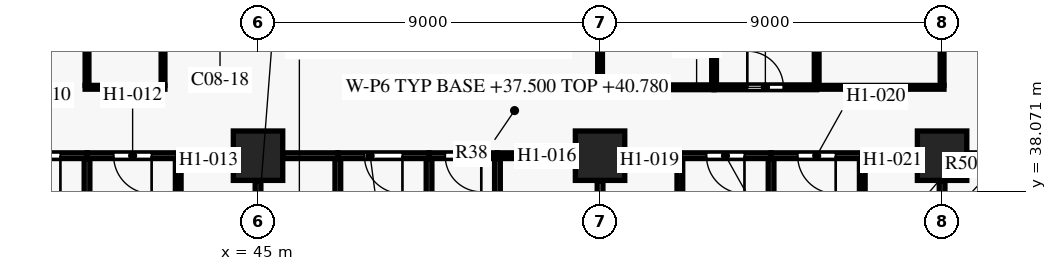
"""IFC4 building model, lengths in metres.
Left out: names, types, materials, properties, quantities, classifications, styles, units other than length and angle.
Written with IfcOpenShell. Run it as: python <this file> out.ifc"""

import sys

from ifc_helpers import new_model, si_unit, direction, frame, frame_2d, origin, origin_2d, place, context, subcontext, project, spatial, rectangle, extrude, element, fill, save


model = new_model("IFC4")
c1 = context("Model", 3, precision=1e-05, world=origin(), true_north=direction((0.0, 1.0)))
c2 = subcontext(c1, "Body", "Model", "MODEL_VIEW")
j1 = project(units=[si_unit("LENGTHUNIT", "METRE"), si_unit("PLANEANGLEUNIT", "RADIAN")], contexts=[c1])
p1 = place(None, origin())
s1 = spatial("IfcSite", under=j1, at=p1, CompositionType="ELEMENT")
p2 = place(p1, origin())
s2 = spatial("IfcBuilding", under=s1, at=p2, CompositionType="ELEMENT")
p3 = place(p2, frame((0.0, 0.0, 37.5)))
s3 = spatial("IfcBuildingStorey", under=s2, at=p3, CompositionType="ELEMENT", Elevation=37.5)
for number, where, z_axis, x_axis in (
    (1, (45.0, 39.0, 0.0), (0.0, 0.0, 1.0), (1.0, 0.0, 0.0)),
    (2, (54.0, 39.0, 0.0), (0.0, 0.0, 1.0), (1.0, 0.0, 0.0)),
    (3, (63.0, 39.0, 0.0), (0.0, 0.0, 1.0), (1.0, 0.0, 0.0)),
):
    element("IfcColumn", number, at=place(p3, frame(where, z_axis=z_axis, x_axis=x_axis)), inside=s3, PredefinedType="COLUMN", context=c2, shape_type="SweptSolid", body=[
        extrude(rectangle(XDim=1.3, YDim=1.3, at=origin_2d()), origin(), (0.0, 0.0, 1.0), 3.6),
    ])
p4 = place(p3, frame((47.1, 36.075, 0.0), z_axis=(0.0, 0.0, 1.0), x_axis=(0.0, 1.0, 0.0)))
e4 = element("IfcWall", 4, at=p4, inside=s3, PredefinedType="PARTITIONING", context=c2, shape_type="SweptSolid", body=[
    extrude(rectangle(XDim=2.85, YDim=0.15, at=frame_2d((1.425, 0.0))), origin(), (0.0, 0.0, 1.0), 2.58),
])
p5 = place(p4, frame((1.025, 0.0, 0.0)))
e5 = element("IfcOpeningElement", 5, at=p5, cuts=e4, PredefinedType="OPENING", context=c2, shape_type="SweptSolid", body=[
    extrude(rectangle(XDim=0.8, YDim=2.1, at=frame_2d((0.4, 1.05))), frame((0.0, 0.085, 0.0), z_axis=(0.0, -1.0, 0.0), x_axis=(1.0, 0.0, 0.0)), (0.0, 0.0, 1.0), 0.17),
])
p6 = place(p3, frame((56.1, 36.075, 0.0), z_axis=(0.0, 0.0, 1.0), x_axis=(0.0, 1.0, 0.0)))
e6 = element("IfcWall", 6, at=p6, inside=s3, PredefinedType="PARTITIONING", context=c2, shape_type="SweptSolid", body=[
    extrude(rectangle(XDim=2.85, YDim=0.15, at=frame_2d((1.425, 0.0))), origin(), (0.0, 0.0, 1.0), 2.58),
])
p7 = place(p6, frame((1.025, 0.0, 0.0)))
e7 = element("IfcOpeningElement", 7, at=p7, cuts=e6, PredefinedType="OPENING", context=c2, shape_type="SweptSolid", body=[
    extrude(rectangle(XDim=0.8, YDim=2.1, at=frame_2d((0.4, 1.05))), frame((0.0, 0.085, 0.0), z_axis=(0.0, -1.0, 0.0), x_axis=(1.0, 0.0, 0.0)), (0.0, 0.0, 1.0), 0.17),
])
for number, where, z_axis, x_axis in (
    (8, (45.0, 38.345, 0.0), (0.0, 0.0, 1.0), (0.0, -1.0, 0.0)),
    (9, (54.0, 38.345, 0.0), (0.0, 0.0, 1.0), (0.0, -1.0, 0.0)),
    (10, (63.0, 38.345, 0.0), (0.0, 0.0, 1.0), (0.0, -1.0, 0.0)),
):
    element("IfcWall", number, at=place(p3, frame(where, z_axis=z_axis, x_axis=x_axis)), inside=s3, PredefinedType="PARTITIONING", context=c2, shape_type="SweptSolid", body=[
        extrude(rectangle(XDim=2.27, YDim=0.15, at=frame_2d((1.135, 0.0))), origin(), (0.0, 0.0, 1.0), 2.73),
    ])
p8 = place(p3, frame((40.5, 38.925, 0.0), z_axis=(0.0, 0.0, 1.0), x_axis=(0.0, -1.0, 0.0)))
e11 = element("IfcWall", 11, at=p8, inside=s3, PredefinedType="PARTITIONING", context=c2, shape_type="SweptSolid", body=[
    extrude(rectangle(XDim=11.35, YDim=0.15, at=frame_2d((5.675, 0.0))), origin(), (0.0, 0.0, 1.0), 2.58),
])
p9 = place(p3, frame((42.9, 38.925, 0.0), z_axis=(0.0, 0.0, 1.0), x_axis=(0.0, -1.0, 0.0)))
e12 = element("IfcWall", 12, at=p9, inside=s3, PredefinedType="PARTITIONING", context=c2, shape_type="SweptSolid", body=[
    extrude(rectangle(XDim=2.85, YDim=0.15, at=frame_2d((1.425, 0.0))), origin(), (0.0, 0.0, 1.0), 2.58),
])
p10 = place(p9, frame((1.025, 0.0, 0.0)))
e13 = element("IfcOpeningElement", 13, at=p10, cuts=e12, PredefinedType="OPENING", context=c2, shape_type="SweptSolid", body=[
    extrude(rectangle(XDim=0.8, YDim=2.1, at=frame_2d((0.4, 1.05))), frame((0.0, 0.085, 0.0), z_axis=(0.0, -1.0, 0.0), x_axis=(1.0, 0.0, 0.0)), (0.0, 0.0, 1.0), 0.17),
])
p11 = place(p3, frame((49.5, 38.925, 0.0), z_axis=(0.0, 0.0, 1.0), x_axis=(0.0, -1.0, 0.0)))
e14 = element("IfcWall", 14, at=p11, inside=s3, PredefinedType="PARTITIONING", context=c2, shape_type="SweptSolid", body=[
    extrude(rectangle(XDim=11.35, YDim=0.15, at=frame_2d((5.675, 0.0))), origin(), (0.0, 0.0, 1.0), 2.58),
])
p12 = place(p3, frame((51.3, 38.925, 0.0), z_axis=(0.0, 0.0, 1.0), x_axis=(0.0, -1.0, 0.0)))
e15 = element("IfcWall", 15, at=p12, inside=s3, PredefinedType="PARTITIONING", context=c2, shape_type="SweptSolid", body=[
    extrude(rectangle(XDim=2.85, YDim=0.15, at=frame_2d((1.425, 0.0))), origin(), (0.0, 0.0, 1.0), 2.58),
])
p13 = place(p12, frame((0.95, 0.0, 0.0)))
e16 = element("IfcOpeningElement", 16, at=p13, cuts=e15, PredefinedType="OPENING", context=c2, shape_type="SweptSolid", body=[
    extrude(rectangle(XDim=0.95, YDim=2.1, at=frame_2d((0.475, 1.05))), frame((0.0, 0.085, 0.0), z_axis=(0.0, -1.0, 0.0), x_axis=(1.0, 0.0, 0.0)), (0.0, 0.0, 1.0), 0.17),
])
p14 = place(p3, frame((58.5, 38.925, 0.0), z_axis=(0.0, 0.0, 1.0), x_axis=(0.0, -1.0, 0.0)))
e17 = element("IfcWall", 17, at=p14, inside=s3, PredefinedType="PARTITIONING", context=c2, shape_type="SweptSolid", body=[
    extrude(rectangle(XDim=11.35, YDim=0.15, at=frame_2d((5.675, 0.0))), origin(), (0.0, 0.0, 1.0), 2.58),
])
p15 = place(p3, frame((60.9, 38.925, 0.0), z_axis=(0.0, 0.0, 1.0), x_axis=(0.0, -1.0, 0.0)))
e18 = element("IfcWall", 18, at=p15, inside=s3, PredefinedType="PARTITIONING", context=c2, shape_type="SweptSolid", body=[
    extrude(rectangle(XDim=2.85, YDim=0.15, at=frame_2d((1.425, 0.0))), origin(), (0.0, 0.0, 1.0), 2.58),
])
p16 = place(p15, frame((1.025, 0.0, 0.0)))
e19 = element("IfcOpeningElement", 19, at=p16, cuts=e18, PredefinedType="OPENING", context=c2, shape_type="SweptSolid", body=[
    extrude(rectangle(XDim=0.8, YDim=2.1, at=frame_2d((0.4, 1.05))), frame((0.0, 0.085, 0.0), z_axis=(0.0, -1.0, 0.0), x_axis=(1.0, 0.0, 0.0)), (0.0, 0.0, 1.0), 0.17),
])
p17 = place(p3, frame((40.5, 39.0, 0.0), z_axis=(0.0, 0.0, 1.0), x_axis=(-1.0, 0.0, 0.0)))
e20 = element("IfcWall", 20, at=p17, inside=s3, PredefinedType="PARTITIONING", context=c2, shape_type="SweptSolid", body=[
    extrude(rectangle(XDim=2.4, YDim=0.15, at=frame_2d((1.2, 0.0))), origin(), (0.0, 0.0, 1.0), 2.58),
])
p18 = place(p17, frame((0.7, 0.0, 0.0)))
e21 = element("IfcOpeningElement", 21, at=p18, cuts=e20, PredefinedType="OPENING", context=c2, shape_type="SweptSolid", body=[
    extrude(rectangle(XDim=1.0, YDim=2.1, at=frame_2d((0.5, 1.05))), frame((0.0, 0.085, 0.0), z_axis=(0.0, -1.0, 0.0), x_axis=(1.0, 0.0, 0.0)), (0.0, 0.0, 1.0), 0.17),
])
p19 = place(p3, frame((42.9, 39.0, 0.0), z_axis=(0.0, 0.0, 1.0), x_axis=(-1.0, 0.0, 0.0)))
e22 = element("IfcWall", 22, at=p19, inside=s3, PredefinedType="PARTITIONING", context=c2, shape_type="SweptSolid", body=[
    extrude(rectangle(XDim=2.4, YDim=0.15, at=frame_2d((1.2, 0.0))), origin(), (0.0, 0.0, 1.0), 2.58),
])
p20 = place(p19, frame((0.7, 0.0, 0.0)))
e23 = element("IfcOpeningElement", 23, at=p20, cuts=e22, PredefinedType="OPENING", context=c2, shape_type="SweptSolid", body=[
    extrude(rectangle(XDim=1.0, YDim=2.1, at=frame_2d((0.5, 1.05))), frame((0.0, 0.085, 0.0), z_axis=(0.0, -1.0, 0.0), x_axis=(1.0, 0.0, 0.0)), (0.0, 0.0, 1.0), 0.17),
])
for number, where, z_axis, x_axis in (
    (24, (44.345, 39.0, 0.0), (0.0, 0.0, 1.0), (-1.0, 0.0, 0.0)),
    (25, (47.1, 39.0, 0.0), (0.0, 0.0, 1.0), (-1.0, 0.0, 0.0)),
):
    element("IfcWall", number, at=place(p3, frame(where, z_axis=z_axis, x_axis=x_axis)), inside=s3, PredefinedType="PARTITIONING", context=c2, shape_type="SweptSolid", body=[
        extrude(rectangle(XDim=1.445, YDim=0.15, at=frame_2d((0.723, 0.0))), origin(), (0.0, 0.0, 1.0), 2.58),
    ])
p21 = place(p3, frame((49.5, 39.0, 0.0), z_axis=(0.0, 0.0, 1.0), x_axis=(-1.0, 0.0, 0.0)))
e26 = element("IfcWall", 26, at=p21, inside=s3, PredefinedType="PARTITIONING", context=c2, shape_type="SweptSolid", body=[
    extrude(rectangle(XDim=2.4, YDim=0.15, at=frame_2d((1.2, 0.0))), origin(), (0.0, 0.0, 1.0), 2.58),
])
p22 = place(p21, frame((0.7, 0.0, 0.0)))
e27 = element("IfcOpeningElement", 27, at=p22, cuts=e26, PredefinedType="OPENING", context=c2, shape_type="SweptSolid", body=[
    extrude(rectangle(XDim=1.0, YDim=2.1, at=frame_2d((0.5, 1.05))), frame((0.0, 0.085, 0.0), z_axis=(0.0, -1.0, 0.0), x_axis=(1.0, 0.0, 0.0)), (0.0, 0.0, 1.0), 0.17),
])
p23 = place(p3, frame((51.3, 39.0, 0.0), z_axis=(0.0, 0.0, 1.0), x_axis=(-1.0, 0.0, 0.0)))
e28 = element("IfcWall", 28, at=p23, inside=s3, PredefinedType="PARTITIONING", context=c2, shape_type="SweptSolid", body=[
    extrude(rectangle(XDim=1.8, YDim=0.15, at=frame_2d((0.9, 0.0))), origin(), (0.0, 0.0, 1.0), 2.58),
])
p24 = place(p23, frame((0.425, 0.0, 0.0)))
e29 = element("IfcOpeningElement", 29, at=p24, cuts=e28, PredefinedType="OPENING", context=c2, shape_type="SweptSolid", body=[
    extrude(rectangle(XDim=0.95, YDim=2.1, at=frame_2d((0.475, 1.05))), frame((0.0, 0.085, 0.0), z_axis=(0.0, -1.0, 0.0), x_axis=(1.0, 0.0, 0.0)), (0.0, 0.0, 1.0), 0.17),
])
p25 = place(p3, frame((53.345, 39.0, 0.0), z_axis=(0.0, 0.0, 1.0), x_axis=(-1.0, 0.0, 0.0)))
e30 = element("IfcWall", 30, at=p25, inside=s3, PredefinedType="PARTITIONING", context=c2, shape_type="SweptSolid", body=[
    extrude(rectangle(XDim=2.045, YDim=0.15, at=frame_2d((1.022, 0.0))), origin(), (0.0, 0.0, 1.0), 2.58),
])
p26 = place(p3, frame((56.1, 39.0, 0.0), z_axis=(0.0, 0.0, 1.0), x_axis=(-1.0, 0.0, 0.0)))
e31 = element("IfcWall", 31, at=p26, inside=s3, PredefinedType="PARTITIONING", context=c2, shape_type="SweptSolid", body=[
    extrude(rectangle(XDim=1.445, YDim=0.15, at=frame_2d((0.723, 0.0))), origin(), (0.0, 0.0, 1.0), 2.58),
])
p27 = place(p3, frame((58.5, 39.0, 0.0), z_axis=(0.0, 0.0, 1.0), x_axis=(-1.0, 0.0, 0.0)))
e32 = element("IfcWall", 32, at=p27, inside=s3, PredefinedType="PARTITIONING", context=c2, shape_type="SweptSolid", body=[
    extrude(rectangle(XDim=2.4, YDim=0.15, at=frame_2d((1.2, 0.0))), origin(), (0.0, 0.0, 1.0), 2.58),
])
p28 = place(p27, frame((0.7, 0.0, 0.0)))
e33 = element("IfcOpeningElement", 33, at=p28, cuts=e32, PredefinedType="OPENING", context=c2, shape_type="SweptSolid", body=[
    extrude(rectangle(XDim=1.0, YDim=2.1, at=frame_2d((0.5, 1.05))), frame((0.0, 0.085, 0.0), z_axis=(0.0, -1.0, 0.0), x_axis=(1.0, 0.0, 0.0)), (0.0, 0.0, 1.0), 0.17),
])
p29 = place(p3, frame((60.9, 39.0, 0.0), z_axis=(0.0, 0.0, 1.0), x_axis=(-1.0, 0.0, 0.0)))
e34 = element("IfcWall", 34, at=p29, inside=s3, PredefinedType="PARTITIONING", context=c2, shape_type="SweptSolid", body=[
    extrude(rectangle(XDim=2.4, YDim=0.15, at=frame_2d((1.2, 0.0))), origin(), (0.0, 0.0, 1.0), 2.58),
])
p30 = place(p29, frame((0.7, 0.0, 0.0)))
e35 = element("IfcOpeningElement", 35, at=p30, cuts=e34, PredefinedType="OPENING", context=c2, shape_type="SweptSolid", body=[
    extrude(rectangle(XDim=1.0, YDim=2.1, at=frame_2d((0.5, 1.05))), frame((0.0, 0.085, 0.0), z_axis=(0.0, -1.0, 0.0), x_axis=(1.0, 0.0, 0.0)), (0.0, 0.0, 1.0), 0.17),
])
p31 = place(p3, frame((62.345, 39.0, 0.0), z_axis=(0.0, 0.0, 1.0), x_axis=(-1.0, 0.0, 0.0)))
e36 = element("IfcWall", 36, at=p31, inside=s3, PredefinedType="PARTITIONING", context=c2, shape_type="SweptSolid", body=[
    extrude(rectangle(XDim=1.445, YDim=0.15, at=frame_2d((0.723, 0.0))), origin(), (0.0, 0.0, 1.0), 2.58),
])
p32 = place(p3, frame((64.875, 39.0, 0.0), z_axis=(0.0, 0.0, 1.0), x_axis=(-1.0, 0.0, 0.0)))
e37 = element("IfcWall", 37, at=p32, inside=s3, PredefinedType="PARTITIONING", context=c2, shape_type="SweptSolid", body=[
    extrude(rectangle(XDim=1.22, YDim=0.15, at=frame_2d((0.61, 0.0))), origin(), (0.0, 0.0, 1.0), 2.58),
])
p33 = place(p3, frame((40.45, 40.8, 0.0), z_axis=(0.0, 0.0, 1.0), x_axis=(1.0, 0.0, 0.0)))
e38 = element("IfcWall", 38, at=p33, inside=s3, PredefinedType="PARTITIONING", context=c2, shape_type="SweptSolid", body=[
    extrude(rectangle(XDim=2.1, YDim=0.1, at=frame_2d((1.05, 0.0))), origin(), (0.0, 0.0, 1.0), 3.28),
])
p34 = place(p3, frame((53.938, 40.8, 0.0), z_axis=(0.0, 0.0, 1.0), x_axis=(1.0, 0.0, 0.0)))
e39 = element("IfcWall", 39, at=p34, inside=s3, PredefinedType="PARTITIONING", context=c2, shape_type="SweptSolid", body=[
    extrude(rectangle(XDim=3.062, YDim=0.125, at=frame_2d((1.531, 0.0))), origin(), (0.0, 0.0, 1.0), 2.73),
])
p35 = place(p3, frame((57.0, 40.8, 0.0), z_axis=(0.0, 0.0, 1.0), x_axis=(1.0, 0.0, 0.0)))
e40 = element("IfcWall", 40, at=p35, inside=s3, PredefinedType="PARTITIONING", context=c2, shape_type="SweptSolid", body=[
    extrude(rectangle(XDim=2.7, YDim=0.125, at=frame_2d((1.35, 0.0))), origin(), (0.0, 0.0, 1.0), 3.28),
])
p36 = place(p35, frame((0.875, 0.0, 0.0)))
e41 = element("IfcOpeningElement", 41, at=p36, cuts=e40, PredefinedType="OPENING", context=c2, shape_type="SweptSolid", body=[
    extrude(rectangle(XDim=0.95, YDim=2.1, at=frame_2d((0.475, 1.05))), frame((0.0, 0.073, 0.0), z_axis=(0.0, -1.0, 0.0), x_axis=(1.0, 0.0, 0.0)), (0.0, 0.0, 1.0), 0.145),
])
p37 = place(p3, frame((59.7, 40.8, 0.0), z_axis=(0.0, 0.0, 1.0), x_axis=(1.0, 0.0, 0.0)))
e42 = element("IfcWall", 42, at=p37, inside=s3, PredefinedType="PARTITIONING", context=c2, shape_type="SweptSolid", body=[
    extrude(rectangle(XDim=3.35, YDim=0.1, at=frame_2d((1.675, 0.0))), origin(), (0.0, 0.0, 1.0), 2.73),
])
p38 = place(p3, frame((63.0, 40.85, 0.0), z_axis=(0.0, 0.0, 1.0), x_axis=(0.0, 1.0, 0.0)))
e43 = element("IfcWall", 43, at=p38, inside=s3, PredefinedType="PARTITIONING", context=c2, shape_type="SweptSolid", body=[
    extrude(rectangle(XDim=8.3, YDim=0.1, at=frame_2d((4.15, 0.0))), origin(), (0.0, 0.0, 1.0), 2.73),
])
p39 = place(p3, frame((54.0, 49.137, 0.0), z_axis=(0.0, 0.0, 1.0), x_axis=(0.0, -1.0, 0.0)))
e44 = element("IfcWall", 44, at=p39, inside=s3, PredefinedType="PARTITIONING", context=c2, shape_type="SweptSolid", body=[
    extrude(rectangle(XDim=8.275, YDim=0.125, at=frame_2d((4.137, 0.0))), origin(), (0.0, 0.0, 1.0), 2.73),
])
for number, where, z_axis, x_axis in (
    (45, (57.0, 49.137, 0.0), (0.0, 0.0, 1.0), (0.0, -1.0, 0.0)),
    (46, (59.7, 49.137, 0.0), (0.0, 0.0, 1.0), (0.0, -1.0, 0.0)),
):
    element("IfcWall", number, at=place(p3, frame(where, z_axis=z_axis, x_axis=x_axis)), inside=s3, PredefinedType="PARTITIONING", context=c2, shape_type="SweptSolid", body=[
        extrude(rectangle(XDim=8.275, YDim=0.125, at=frame_2d((4.137, 0.0))), origin(), (0.0, 0.0, 1.0), 3.28),
    ])
for number, where, z_axis, x_axis in (
    (47, (40.5, 49.15, 0.0), (0.0, 0.0, 1.0), (0.0, -1.0, 0.0)),
    (48, (42.5, 49.15, 0.0), (0.0, 0.0, 1.0), (0.0, -1.0, 0.0)),
):
    element("IfcWall", number, at=place(p3, frame(where, z_axis=z_axis, x_axis=x_axis)), inside=s3, PredefinedType="PARTITIONING", context=c2, shape_type="SweptSolid", body=[
        extrude(rectangle(XDim=8.3, YDim=0.1, at=frame_2d((4.15, 0.0))), origin(), (0.0, 0.0, 1.0), 3.28),
    ])
p40 = place(p18, origin())
e49 = element("IfcDoor", 49, at=p40, inside=s3, OperationType="SINGLE_SWING_LEFT", PredefinedType="DOOR", context=c2, shape_type="SweptSolid", body=[
    extrude(rectangle(XDim=1.0, YDim=2.1, at=frame_2d((0.5, 1.05))), frame((0.0, 0.025, 0.0), z_axis=(0.0, -1.0, 0.0), x_axis=(1.0, 0.0, 0.0)), (0.0, 0.0, 1.0), 0.05),
])
fill(e21, e49)
p41 = place(p20, origin())
e50 = element("IfcDoor", 50, at=p41, inside=s3, OperationType="SINGLE_SWING_LEFT", PredefinedType="DOOR", context=c2, shape_type="SweptSolid", body=[
    extrude(rectangle(XDim=1.0, YDim=2.1, at=frame_2d((0.5, 1.05))), frame((0.0, 0.025, 0.0), z_axis=(0.0, -1.0, 0.0), x_axis=(1.0, 0.0, 0.0)), (0.0, 0.0, 1.0), 0.05),
])
fill(e23, e50)
p42 = place(p22, origin())
e51 = element("IfcDoor", 51, at=p42, inside=s3, OperationType="SINGLE_SWING_LEFT", PredefinedType="DOOR", context=c2, shape_type="SweptSolid", body=[
    extrude(rectangle(XDim=1.0, YDim=2.1, at=frame_2d((0.5, 1.05))), frame((0.0, 0.025, 0.0), z_axis=(0.0, -1.0, 0.0), x_axis=(1.0, 0.0, 0.0)), (0.0, 0.0, 1.0), 0.05),
])
fill(e27, e51)
p43 = place(p24, origin())
e52 = element("IfcDoor", 52, at=p43, inside=s3, OperationType="SINGLE_SWING_LEFT", PredefinedType="DOOR", context=c2, shape_type="SweptSolid", body=[
    extrude(rectangle(XDim=0.95, YDim=2.1, at=frame_2d((0.475, 1.05))), frame((0.0, 0.025, 0.0), z_axis=(0.0, -1.0, 0.0), x_axis=(1.0, 0.0, 0.0)), (0.0, 0.0, 1.0), 0.05),
])
fill(e29, e52)
p44 = place(p28, origin())
e53 = element("IfcDoor", 53, at=p44, inside=s3, OperationType="SINGLE_SWING_LEFT", PredefinedType="DOOR", context=c2, shape_type="SweptSolid", body=[
    extrude(rectangle(XDim=1.0, YDim=2.1, at=frame_2d((0.5, 1.05))), frame((0.0, 0.025, 0.0), z_axis=(0.0, -1.0, 0.0), x_axis=(1.0, 0.0, 0.0)), (0.0, 0.0, 1.0), 0.05),
])
fill(e33, e53)
p45 = place(p30, origin())
e54 = element("IfcDoor", 54, at=p45, inside=s3, OperationType="SINGLE_SWING_LEFT", PredefinedType="DOOR", context=c2, shape_type="SweptSolid", body=[
    extrude(rectangle(XDim=1.0, YDim=2.1, at=frame_2d((0.5, 1.05))), frame((0.0, 0.025, 0.0), z_axis=(0.0, -1.0, 0.0), x_axis=(1.0, 0.0, 0.0)), (0.0, 0.0, 1.0), 0.05),
])
fill(e35, e54)
p46 = place(p36, origin())
e55 = element("IfcDoor", 55, at=p46, inside=s3, OperationType="SINGLE_SWING_LEFT", PredefinedType="DOOR", context=c2, shape_type="SweptSolid", body=[
    extrude(rectangle(XDim=0.95, YDim=2.1, at=frame_2d((0.475, 1.05))), frame((0.0, 0.025, 0.0), z_axis=(0.0, -1.0, 0.0), x_axis=(1.0, 0.0, 0.0)), (0.0, 0.0, 1.0), 0.05),
])
fill(e41, e55)
save(model, sys.argv[1])
